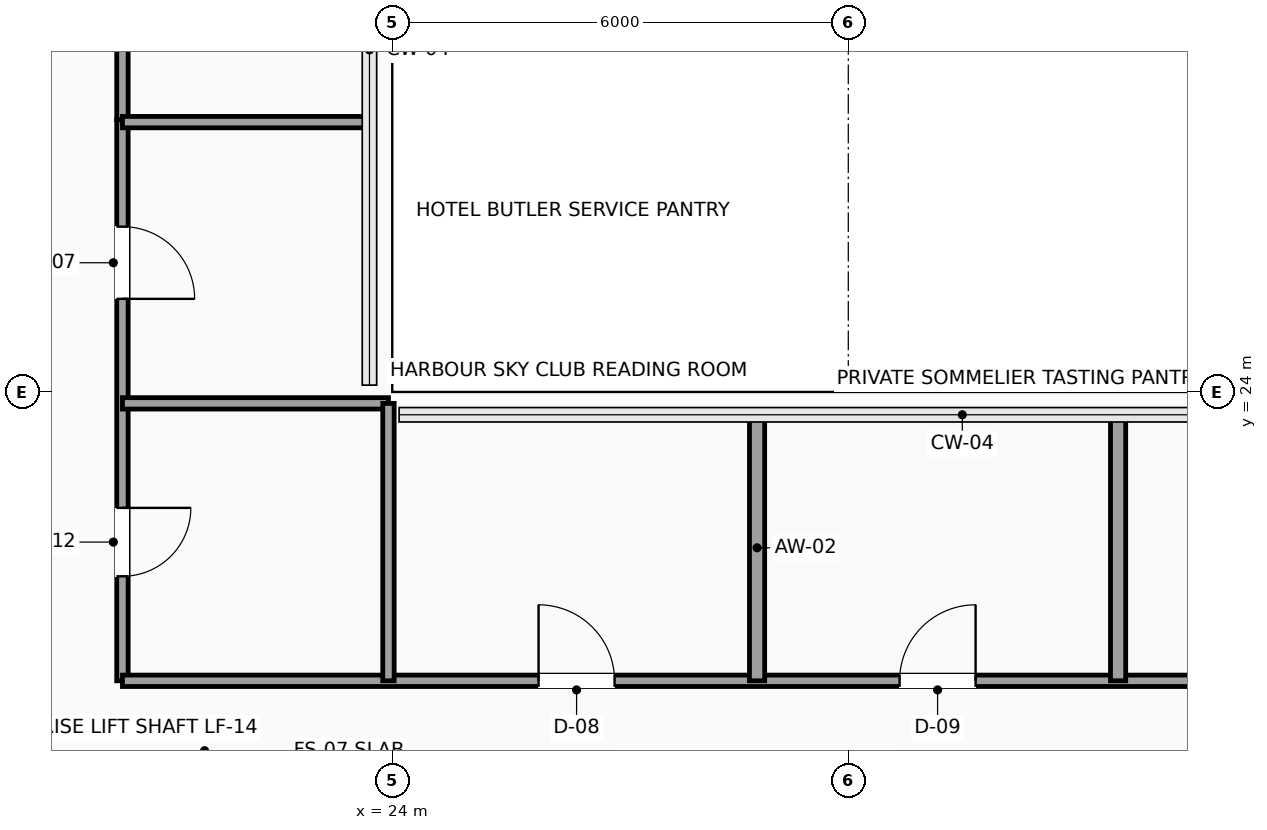
"""IFC4 building model, lengths in metres.
Left out: names, types, materials, properties, quantities, classifications, styles, units other than length and angle.
Written with IfcOpenShell. Run it as: python <this file> out.ifc"""

import sys

from ifc_helpers import new_model, si_unit, direction, frame, frame_2d, origin, place, context, subcontext, project, spatial, rectangle, extrude, element, fill, save


model = new_model("IFC4")
c1 = context("Model", 3, precision=1e-05, world=origin(), true_north=direction((0.0, 1.0)))
c2 = subcontext(c1, "Body", "Model", "MODEL_VIEW")
j1 = project(units=[si_unit("LENGTHUNIT", "METRE"), si_unit("PLANEANGLEUNIT", "RADIAN")], contexts=[c1])
p1 = place(None, origin())
s1 = spatial("IfcSite", under=j1, at=p1, CompositionType="ELEMENT")
p2 = place(p1, origin())
s2 = spatial("IfcBuilding", under=s1, at=p2, CompositionType="ELEMENT")
p3 = place(p2, frame((0.0, 0.0, 231.15)))
s3 = spatial("IfcBuildingStorey", under=s2, at=p3, CompositionType="ELEMENT", Elevation=231.15)
p4 = place(p3, frame((20.45, 30.25, 0.0), z_axis=(0.0, 0.0, 1.0), x_axis=(0.0, -1.0, 0.0)))
e1 = element("IfcWall", 1, at=p4, inside=s3, PredefinedType="PARTITIONING", context=c2, shape_type="SweptSolid", body=[
    extrude(rectangle(XDim=2.67, YDim=0.15, at=frame_2d((1.335, 0.0))), origin(), (0.0, 0.0, 1.0), 3.425),
])
p5 = place(p3, frame((20.45, 27.58, 0.0), z_axis=(0.0, 0.0, 1.0), x_axis=(0.0, -1.0, 0.0)))
e2 = element("IfcWall", 2, at=p5, inside=s3, PredefinedType="PARTITIONING", context=c2, shape_type="SweptSolid", body=[
    extrude(rectangle(XDim=7.38, YDim=0.15, at=frame_2d((3.69, 0.0))), origin(), (0.0, 0.0, 1.0), 3.425),
])
p6 = place(p5, frame((5.105, 0.0, 0.0)))
e3 = element("IfcOpeningElement", 3, at=p6, cuts=e2, PredefinedType="OPENING", context=c2, shape_type="SweptSolid", body=[
    extrude(rectangle(XDim=0.9, YDim=2.1, at=frame_2d((0.45, 1.05))), frame((0.0, 0.085, 0.0), z_axis=(0.0, -1.0, 0.0), x_axis=(1.0, 0.0, 0.0)), (0.0, 0.0, 1.0), 0.17),
])
p7 = place(p5, frame((1.405, 0.0, 0.0)))
e4 = element("IfcOpeningElement", 4, at=p7, cuts=e2, PredefinedType="OPENING", context=c2, shape_type="SweptSolid", body=[
    extrude(rectangle(XDim=0.95, YDim=2.15, at=frame_2d((0.475, 1.075))), frame((0.0, 0.085, 0.0), z_axis=(0.0, -1.0, 0.0), x_axis=(1.0, 0.0, 0.0)), (0.0, 0.0, 1.0), 0.17),
])
p8 = place(p3, frame((20.45, 20.2, 0.0), z_axis=(0.0, 0.0, 1.0), x_axis=(1.0, 0.0, 0.0)))
e5 = element("IfcWall", 5, at=p8, inside=s3, PredefinedType="PARTITIONING", context=c2, shape_type="SweptSolid", body=[
    extrude(rectangle(XDim=15.7, YDim=0.15, at=frame_2d((7.85, 0.0))), origin(), (0.0, 0.0, 1.0), 3.425),
])
p9 = place(p8, frame((5.475, 0.0, 0.0)))
e6 = element("IfcOpeningElement", 6, at=p9, cuts=e5, PredefinedType="OPENING", context=c2, shape_type="SweptSolid", body=[
    extrude(rectangle(XDim=1.0, YDim=2.2, at=frame_2d((0.5, 1.1))), frame((0.0, 0.085, 0.0), z_axis=(0.0, -1.0, 0.0), x_axis=(1.0, 0.0, 0.0)), (0.0, 0.0, 1.0), 0.17),
])
p10 = place(p8, frame((10.225, 0.0, 0.0)))
e7 = element("IfcOpeningElement", 7, at=p10, cuts=e5, PredefinedType="OPENING", context=c2, shape_type="SweptSolid", body=[
    extrude(rectangle(XDim=1.0, YDim=2.2, at=frame_2d((0.5, 1.1))), frame((0.0, 0.085, 0.0), z_axis=(0.0, -1.0, 0.0), x_axis=(1.0, 0.0, 0.0)), (0.0, 0.0, 1.0), 0.17),
])
p11 = place(p3, frame((20.45, 23.85, 0.0), z_axis=(0.0, 0.0, 1.0), x_axis=(1.0, 0.0, 0.0)))
e8 = element("IfcWall", 8, at=p11, inside=s3, PredefinedType="PARTITIONING", context=c2, shape_type="SweptSolid", body=[
    extrude(rectangle(XDim=3.5, YDim=0.15, at=frame_2d((1.75, 0.0))), origin(), (0.0, 0.0, 1.0), 3.425),
])
p12 = place(p3, frame((23.95, 20.2, 0.0), z_axis=(0.0, 0.0, 1.0), x_axis=(0.0, 1.0, 0.0)))
e9 = element("IfcWall", 9, at=p12, inside=s3, PredefinedType="PARTITIONING", context=c2, shape_type="SweptSolid", body=[
    extrude(rectangle(XDim=3.65, YDim=0.15, at=frame_2d((1.825, 0.0))), origin(), (0.0, 0.0, 1.0), 3.425),
])
p13 = place(p3, frame((20.45, 27.55, 0.0), z_axis=(0.0, 0.0, 1.0), x_axis=(1.0, 0.0, 0.0)))
e10 = element("IfcWall", 10, at=p13, inside=s3, PredefinedType="PARTITIONING", context=c2, shape_type="SweptSolid", body=[
    extrude(rectangle(XDim=3.25, YDim=0.15, at=frame_2d((1.625, 0.0))), origin(), (0.0, 0.0, 1.0), 3.425),
])
for number, where, z_axis, x_axis in (
    (11, (28.8, 20.2, 0.0), (0.0, 0.0, 1.0), (0.0, 1.0, 0.0)),
    (12, (33.55, 20.2, 0.0), (0.0, 0.0, 1.0), (0.0, 1.0, 0.0)),
):
    element("IfcWall", number, at=place(p3, frame(where, z_axis=z_axis, x_axis=x_axis)), inside=s3, PredefinedType="PARTITIONING", context=c2, shape_type="SweptSolid", body=[
        extrude(rectangle(XDim=3.5, YDim=0.2, at=frame_2d((1.75, 0.0))), origin(), (0.0, 0.0, 1.0), 3.425),
    ])
p14 = place(p6, origin())
e13 = element("IfcDoor", 13, at=p14, inside=s3, OperationType="SINGLE_SWING_LEFT", PredefinedType="DOOR", context=c2, shape_type="SweptSolid", body=[
    extrude(rectangle(XDim=0.9, YDim=2.1, at=frame_2d((0.45, 1.05))), frame((0.0, 0.025, 0.0), z_axis=(0.0, -1.0, 0.0), x_axis=(1.0, 0.0, 0.0)), (0.0, 0.0, 1.0), 0.05),
])
fill(e3, e13)
p15 = place(p7, origin())
e14 = element("IfcDoor", 14, at=p15, inside=s3, OperationType="SINGLE_SWING_RIGHT", PredefinedType="DOOR", context=c2, shape_type="SweptSolid", body=[
    extrude(rectangle(XDim=0.95, YDim=2.15, at=frame_2d((0.475, 1.075))), frame((0.0, 0.025, 0.0), z_axis=(0.0, -1.0, 0.0), x_axis=(1.0, 0.0, 0.0)), (0.0, 0.0, 1.0), 0.05),
])
fill(e4, e14)
p16 = place(p9, origin())
e15 = element("IfcDoor", 15, at=p16, inside=s3, OperationType="SINGLE_SWING_LEFT", PredefinedType="DOOR", context=c2, shape_type="SweptSolid", body=[
    extrude(rectangle(XDim=1.0, YDim=2.2, at=frame_2d((0.5, 1.1))), frame((0.0, 0.025, 0.0), z_axis=(0.0, -1.0, 0.0), x_axis=(1.0, 0.0, 0.0)), (0.0, 0.0, 1.0), 0.05),
])
fill(e6, e15)
p17 = place(p10, origin())
e16 = element("IfcDoor", 16, at=p17, inside=s3, OperationType="SINGLE_SWING_RIGHT", PredefinedType="DOOR", context=c2, shape_type="SweptSolid", body=[
    extrude(rectangle(XDim=1.0, YDim=2.2, at=frame_2d((0.5, 1.1))), frame((0.0, 0.025, 0.0), z_axis=(0.0, -1.0, 0.0), x_axis=(1.0, 0.0, 0.0)), (0.0, 0.0, 1.0), 0.05),
])
fill(e7, e16)
save(model, sys.argv[1])
